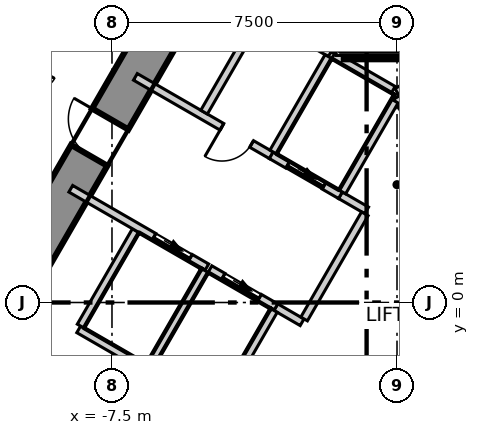
"""IFC4 building model, lengths in metres.
Left out: names, types, materials, properties, quantities, classifications, styles, units other than length and angle.
Written with IfcOpenShell. Run it as: python <this file> out.ifc"""

import sys

from ifc_helpers import new_model, si_unit, direction, frame, frame_2d, origin, place, context, subcontext, project, spatial, polyline, rectangle, outline, extrude, element, fill, save


model = new_model("IFC4")
c1 = context("Model", 3, precision=1e-05, world=origin(), true_north=direction((0.0, 1.0)))
c2 = subcontext(c1, "Body", "Model", "MODEL_VIEW")
j1 = project(units=[si_unit("LENGTHUNIT", "METRE"), si_unit("PLANEANGLEUNIT", "RADIAN")], contexts=[c1])
p1 = place(None, origin())
s1 = spatial("IfcSite", under=j1, at=p1, CompositionType="ELEMENT")
p2 = place(p1, origin())
s2 = spatial("IfcBuilding", under=s1, at=p2, CompositionType="ELEMENT")
p3 = place(p2, frame((0.0, 0.0, 95.3)))
s3 = spatial("IfcBuildingStorey", under=s2, at=p3, CompositionType="ELEMENT", Elevation=95.3)
p4 = place(p3, frame((-1.66, 15.025, -0.3), z_axis=(0.0, 0.0, 1.0), x_axis=(-0.500003780125, -0.866023221317, 0.0)))
e1 = element("IfcWall", 1, at=p4, inside=s3, PredefinedType="SHEAR", context=c2, shape_type="SweptSolid", body=[
    extrude(outline(polyline([(-0.462, -0.55), (1.483, -0.55), (3.428, -0.55), (5.374, -0.55), (7.319, -0.55), (9.264, -0.55), (11.209, -0.55), (13.155, -0.55), (15.1, -0.55), (17.045, -0.55), (18.99, -0.55), (20.936, -0.55), (22.881, -0.55), (24.826, -0.55), (23.902, 0.55), (21.949, 0.55), (19.995, 0.55), (18.042, 0.55), (16.089, 0.55), (14.135, 0.55), (12.182, 0.55), (10.229, 0.55), (8.275, 0.55), (6.322, 0.55), (4.369, 0.55), (2.415, 0.55), (0.462, 0.55), (-0.462, -0.55)])), origin(), (0.0, 0.0, 1.0), 4.2),
])
p5 = place(p4, frame((11.776, 0.0, 0.3)))
e2 = element("IfcOpeningElement", 2, at=p5, cuts=e1, PredefinedType="OPENING", context=c2, shape_type="SweptSolid", body=[
    extrude(rectangle(XDim=1.1, YDim=2.1, at=frame_2d((0.55, 1.05))), frame((0.0, 0.56, 0.0), z_axis=(0.0, -1.0, 0.0), x_axis=(1.0, 0.0, 0.0)), (0.0, 0.0, 1.0), 1.12),
])
p6 = place(p3, frame((-3.234, 36.072, 0.0), z_axis=(0.0, 0.0, 1.0), x_axis=(-0.500009108245, -0.866020145073, 0.0)))
e3 = element("IfcWall", 3, at=p6, inside=s3, PredefinedType="ELEMENTEDWALL", context=c2, shape_type="SweptSolid", body=[
    extrude(rectangle(XDim=59.225, YDim=0.2, at=frame_2d((29.613, 0.0))), origin(), (0.0, 0.0, 1.0), 3.9),
])
p7 = place(p6, frame((2.042, 0.0, 0.9)))
e4 = element("IfcOpeningElement", 4, at=p7, cuts=e3, PredefinedType="OPENING", context=c2, shape_type="SweptSolid", body=[
    extrude(rectangle(XDim=5.6, YDim=2.5, at=frame_2d((2.8, 1.25))), frame((0.0, 0.11, 0.0), z_axis=(0.0, -1.0, 0.0), x_axis=(1.0, 0.0, 0.0)), (0.0, 0.0, 1.0), 0.22),
])
p8 = place(p6, frame((9.122, 0.0, 0.9)))
e5 = element("IfcOpeningElement", 5, at=p8, cuts=e3, PredefinedType="OPENING", context=c2, shape_type="SweptSolid", body=[
    extrude(rectangle(XDim=5.6, YDim=2.5, at=frame_2d((2.8, 1.25))), frame((0.0, 0.11, 0.0), z_axis=(0.0, -1.0, 0.0), x_axis=(1.0, 0.0, 0.0)), (0.0, 0.0, 1.0), 0.22),
])
p9 = place(p6, frame((16.202, 0.0, 0.9)))
e6 = element("IfcOpeningElement", 6, at=p9, cuts=e3, PredefinedType="OPENING", context=c2, shape_type="SweptSolid", body=[
    extrude(rectangle(XDim=5.6, YDim=2.5, at=frame_2d((2.8, 1.25))), frame((0.0, 0.11, 0.0), z_axis=(0.0, -1.0, 0.0), x_axis=(1.0, 0.0, 0.0)), (0.0, 0.0, 1.0), 0.22),
])
p10 = place(p6, frame((23.282, 0.0, 0.9)))
e7 = element("IfcOpeningElement", 7, at=p10, cuts=e3, PredefinedType="OPENING", context=c2, shape_type="SweptSolid", body=[
    extrude(rectangle(XDim=5.6, YDim=2.5, at=frame_2d((2.8, 1.25))), frame((0.0, 0.11, 0.0), z_axis=(0.0, -1.0, 0.0), x_axis=(1.0, 0.0, 0.0)), (0.0, 0.0, 1.0), 0.22),
])
p11 = place(p6, frame((30.362, 0.0, 0.9)))
e8 = element("IfcOpeningElement", 8, at=p11, cuts=e3, PredefinedType="OPENING", context=c2, shape_type="SweptSolid", body=[
    extrude(rectangle(XDim=5.6, YDim=2.5, at=frame_2d((2.8, 1.25))), frame((0.0, 0.11, 0.0), z_axis=(0.0, -1.0, 0.0), x_axis=(1.0, 0.0, 0.0)), (0.0, 0.0, 1.0), 0.22),
])
p12 = place(p6, frame((37.442, 0.0, 0.9)))
e9 = element("IfcOpeningElement", 9, at=p12, cuts=e3, PredefinedType="OPENING", context=c2, shape_type="SweptSolid", body=[
    extrude(rectangle(XDim=5.6, YDim=2.5, at=frame_2d((2.8, 1.25))), frame((0.0, 0.11, 0.0), z_axis=(0.0, -1.0, 0.0), x_axis=(1.0, 0.0, 0.0)), (0.0, 0.0, 1.0), 0.22),
])
p13 = place(p6, frame((44.522, 0.0, 0.9)))
e10 = element("IfcOpeningElement", 10, at=p13, cuts=e3, PredefinedType="OPENING", context=c2, shape_type="SweptSolid", body=[
    extrude(rectangle(XDim=5.6, YDim=2.5, at=frame_2d((2.8, 1.25))), frame((0.0, 0.11, 0.0), z_axis=(0.0, -1.0, 0.0), x_axis=(1.0, 0.0, 0.0)), (0.0, 0.0, 1.0), 0.22),
])
p14 = place(p6, frame((51.602, 0.0, 0.9)))
e11 = element("IfcOpeningElement", 11, at=p14, cuts=e3, PredefinedType="OPENING", context=c2, shape_type="SweptSolid", body=[
    extrude(rectangle(XDim=5.6, YDim=2.5, at=frame_2d((2.8, 1.25))), frame((0.0, 0.11, 0.0), z_axis=(0.0, -1.0, 0.0), x_axis=(1.0, 0.0, 0.0)), (0.0, 0.0, 1.0), 0.22),
])
p15 = place(p3, frame((-16.685, -6.2, 0.0), z_axis=(0.0, 0.0, 1.0), x_axis=(0.500002442456, 0.866023993627, 0.0)))
e12 = element("IfcWall", 12, at=p15, inside=s3, PredefinedType="PARTITIONING", context=c2, shape_type="SweptSolid", body=[
    extrude(rectangle(XDim=27.424, YDim=0.15, at=frame_2d((13.712, 0.0))), origin(), (0.0, 0.0, 1.0), 3.9),
])
p16 = place(p15, frame((23.508, 0.0, 0.0)))
e13 = element("IfcOpeningElement", 13, at=p16, cuts=e12, PredefinedType="OPENING", context=c2, shape_type="SweptSolid", body=[
    extrude(rectangle(XDim=1.2, YDim=2.1, at=frame_2d((0.6, 1.05))), frame((0.0, 0.085, 0.0), z_axis=(0.0, -1.0, 0.0), x_axis=(1.0, 0.0, 0.0)), (0.0, 0.0, 1.0), 0.17),
])
p17 = place(p15, frame((13.112, 0.0, 0.0)))
e14 = element("IfcOpeningElement", 14, at=p17, cuts=e12, PredefinedType="OPENING", context=c2, shape_type="SweptSolid", body=[
    extrude(rectangle(XDim=1.2, YDim=2.1, at=frame_2d((0.6, 1.05))), frame((0.0, 0.085, 0.0), z_axis=(0.0, -1.0, 0.0), x_axis=(1.0, 0.0, 0.0)), (0.0, 0.0, 1.0), 0.17),
])
p18 = place(p15, frame((2.716, 0.0, 0.0)))
e15 = element("IfcOpeningElement", 15, at=p18, cuts=e12, PredefinedType="OPENING", context=c2, shape_type="SweptSolid", body=[
    extrude(rectangle(XDim=1.2, YDim=2.1, at=frame_2d((0.6, 1.05))), frame((0.0, 0.085, 0.0), z_axis=(0.0, -1.0, 0.0), x_axis=(1.0, 0.0, 0.0)), (0.0, 0.0, 1.0), 0.17),
])
p19 = place(p3, frame((-8.376, -0.707, 0.0), z_axis=(0.0, 0.0, 1.0), x_axis=(0.866067520717, -0.499927044236, 0.0)))
e16 = element("IfcWall", 16, at=p19, inside=s3, PredefinedType="SOLIDWALL", context=c2, shape_type="SweptSolid", body=[
    extrude(rectangle(XDim=2.1, YDim=0.2, at=frame_2d((1.05, 0.0))), origin(), (0.0, 0.0, 1.0), 3.9),
])
p20 = place(p3, frame((-8.326, -0.62, 0.0), z_axis=(0.0, 0.0, 1.0), x_axis=(0.500023687443, 0.866011727401, 0.0)))
e17 = element("IfcWall", 17, at=p20, inside=s3, PredefinedType="SOLIDWALL", context=c2, shape_type="SweptSolid", body=[
    extrude(rectangle(XDim=2.9, YDim=0.2, at=frame_2d((1.45, 0.0))), origin(), (0.0, 0.0, 1.0), 3.9),
])
p21 = place(p3, frame((-0.002, 5.541, 0.0), z_axis=(0.0, 0.0, 1.0), x_axis=(0.86600155993, 0.500041296494, 0.0)))
e18 = element("IfcWall", 18, at=p21, inside=s3, PredefinedType="SOLIDWALL", context=c2, shape_type="SweptSolid", body=[
    extrude(rectangle(XDim=4.132, YDim=0.2, at=frame_2d((2.066, 0.0))), origin(), (0.0, 0.0, 1.0), 3.9),
])
p22 = place(p3, frame((0.0, 5.4, 0.0), z_axis=(0.0, 0.0, 1.0), x_axis=(0.500103862429, -0.865965430478, 0.0)))
e19 = element("IfcWall", 19, at=p22, inside=s3, PredefinedType="SOLIDWALL", context=c2, shape_type="SweptSolid", body=[
    extrude(rectangle(XDim=2.973, YDim=0.2, at=frame_2d((1.487, 0.0))), origin(), (0.0, 0.0, 1.0), 3.9),
])
p23 = place(p22, frame((0.937, 0.0, 0.0)))
e20 = element("IfcOpeningElement", 20, at=p23, cuts=e19, PredefinedType="OPENING", context=c2, shape_type="SweptSolid", body=[
    extrude(rectangle(XDim=1.1, YDim=2.1, at=frame_2d((0.55, 1.05))), frame((0.0, 0.11, 0.0), z_axis=(0.0, -1.0, 0.0), x_axis=(1.0, 0.0, 0.0)), (0.0, 0.0, 1.0), 0.22),
])
p24 = place(p3, frame((-8.584, 2.993, 0.0), z_axis=(0.0, 0.0, 1.0), x_axis=(0.866075409494, -0.499913377567, 0.0)))
e21 = element("IfcWall", 21, at=p24, inside=s3, PredefinedType="SOLIDWALL", context=c2, shape_type="SweptSolid", body=[
    extrude(rectangle(XDim=4.133, YDim=0.2, at=frame_2d((2.066, 0.0))), origin(), (0.0, 0.0, 1.0), 3.9),
])
p25 = place(p24, frame((2.53, 0.0, 0.0)))
e22 = element("IfcOpeningElement", 22, at=p25, cuts=e21, PredefinedType="OPENING", context=c2, shape_type="SweptSolid", body=[
    extrude(rectangle(XDim=1.1, YDim=2.1, at=frame_2d((0.55, 1.05))), frame((0.0, 0.11, 0.0), z_axis=(0.0, -1.0, 0.0), x_axis=(1.0, 0.0, 0.0)), (0.0, 0.0, 1.0), 0.22),
])
p26 = place(p3, frame((-3.188, -0.122, 0.0), z_axis=(0.0, 0.0, 1.0), x_axis=(0.865705793592, -0.50055317294, 0.0)))
e23 = element("IfcWall", 23, at=p26, inside=s3, PredefinedType="SOLIDWALL", context=c2, shape_type="SweptSolid", body=[
    extrude(rectangle(XDim=0.797, YDim=0.2, at=frame_2d((0.398, 0.0))), origin(), (0.0, 0.0, 1.0), 3.9),
])
p27 = place(p3, frame((-6.884, 5.937, 0.0), z_axis=(0.0, 0.0, 1.0), x_axis=(0.866075409494, -0.499913377567, 0.0)))
e24 = element("IfcWall", 24, at=p27, inside=s3, PredefinedType="SOLIDWALL", context=c2, shape_type="SweptSolid", body=[
    extrude(rectangle(XDim=4.133, YDim=0.2, at=frame_2d((2.066, 0.0))), origin(), (0.0, 0.0, 1.0), 3.9),
])
p28 = place(p27, frame((2.63, 0.0, 0.0)))
e25 = element("IfcOpeningElement", 25, at=p28, cuts=e24, PredefinedType="OPENING", context=c2, shape_type="SweptSolid", body=[
    extrude(rectangle(XDim=0.9, YDim=2.1, at=frame_2d((0.45, 1.05))), frame((0.0, 0.11, 0.0), z_axis=(0.0, -1.0, 0.0), x_axis=(1.0, 0.0, 0.0)), (0.0, 0.0, 1.0), 0.22),
])
p29 = place(p3, frame((-1.488, 2.822, 0.0), z_axis=(0.0, 0.0, 1.0), x_axis=(0.866236612152, -0.499633997809, 0.0)))
e26 = element("IfcWall", 26, at=p29, inside=s3, PredefinedType="SOLIDWALL", context=c2, shape_type="SweptSolid", body=[
    extrude(rectangle(XDim=0.796, YDim=0.2, at=frame_2d((0.398, 0.0))), origin(), (0.0, 0.0, 1.0), 3.9),
])
p30 = place(p3, frame((-5.076, 5.009, 0.0), z_axis=(0.0, 0.0, 1.0), x_axis=(0.50002537861, 0.866010750942, 0.0)))
e27 = element("IfcWall", 27, at=p30, inside=s3, PredefinedType="SOLIDWALL", context=c2, shape_type="SweptSolid", body=[
    extrude(rectangle(XDim=3.0, YDim=0.2, at=frame_2d((1.5, 0.0))), origin(), (0.0, 0.0, 1.0), 3.9),
])
p31 = place(p3, frame((-3.489, 7.557, 0.0), z_axis=(0.0, 0.0, 1.0), x_axis=(0.866010750942, -0.50002537861, 0.0)))
e28 = element("IfcWall", 28, at=p31, inside=s3, PredefinedType="SOLIDWALL", context=c2, shape_type="SweptSolid", body=[
    extrude(rectangle(XDim=2.0, YDim=0.2, at=frame_2d((1.0, 0.0))), origin(), (0.0, 0.0, 1.0), 3.9),
])
p32 = place(p3, frame((-2.444, -0.433, 0.0), z_axis=(0.0, 0.0, 1.0), x_axis=(0.500035624827, 0.866004834804, 0.0)))
e29 = element("IfcWall", 29, at=p32, inside=s3, PredefinedType="SOLIDWALL", context=c2, shape_type="SweptSolid", body=[
    extrude(rectangle(XDim=3.194, YDim=0.2, at=frame_2d((1.597, 0.0))), origin(), (0.0, 0.0, 1.0), 3.9),
])
p33 = place(p3, frame((-6.507, -1.67, 0.0), z_axis=(0.0, 0.0, 1.0), x_axis=(0.50012328804, 0.865954211699, 0.0)))
e30 = element("IfcWall", 30, at=p33, inside=s3, PredefinedType="SOLIDWALL", context=c2, shape_type="SweptSolid", body=[
    extrude(rectangle(XDim=2.9, YDim=0.2, at=frame_2d((1.45, 0.0))), origin(), (0.0, 0.0, 1.0), 3.9),
])
p34 = place(p3, frame((-4.922, 0.879, 0.0), z_axis=(0.0, 0.0, 1.0), x_axis=(0.866073918653, -0.499915960366, 0.0)))
e31 = element("IfcWall", 31, at=p34, inside=s3, PredefinedType="SOLIDWALL", context=c2, shape_type="SweptSolid", body=[
    extrude(rectangle(XDim=2.002, YDim=0.2, at=frame_2d((1.001, 0.0))), origin(), (0.0, 0.0, 1.0), 3.9),
])
p35 = place(p34, frame((0.402, 0.0, 0.0)))
e32 = element("IfcOpeningElement", 32, at=p35, cuts=e31, PredefinedType="OPENING", context=c2, shape_type="SweptSolid", body=[
    extrude(rectangle(XDim=1.1, YDim=2.1, at=frame_2d((0.55, 1.05))), frame((0.0, 0.11, 0.0), z_axis=(0.0, -1.0, 0.0), x_axis=(1.0, 0.0, 0.0)), (0.0, 0.0, 1.0), 0.22),
])
p36 = place(p3, frame((-4.619, -2.6, 0.0), z_axis=(0.0, 0.0, 1.0), x_axis=(0.50009492287, 0.865970593103, 0.0)))
e33 = element("IfcWall", 33, at=p36, inside=s3, PredefinedType="SOLIDWALL", context=c2, shape_type="SweptSolid", body=[
    extrude(rectangle(XDim=2.761, YDim=0.2, at=frame_2d((1.381, 0.0))), origin(), (0.0, 0.0, 1.0), 3.9),
])
p37 = place(p3, frame((-3.309, 3.873, 0.0), z_axis=(0.0, 0.0, 1.0), x_axis=(0.866098583652, -0.499873227325, 0.0)))
e34 = element("IfcWall", 34, at=p37, inside=s3, PredefinedType="SOLIDWALL", context=c2, shape_type="SweptSolid", body=[
    extrude(rectangle(XDim=2.103, YDim=0.2, at=frame_2d((1.051, 0.0))), origin(), (0.0, 0.0, 1.0), 3.9),
])
p38 = place(p37, frame((0.502, 0.0, 0.0)))
e35 = element("IfcOpeningElement", 35, at=p38, cuts=e34, PredefinedType="OPENING", context=c2, shape_type="SweptSolid", body=[
    extrude(rectangle(XDim=1.1, YDim=2.1, at=frame_2d((0.55, 1.05))), frame((0.0, 0.11, 0.0), z_axis=(0.0, -1.0, 0.0), x_axis=(1.0, 0.0, 0.0)), (0.0, 0.0, 1.0), 0.22),
])
p39 = place(p3, frame((-3.257, 3.959, 0.0), z_axis=(0.0, 0.0, 1.0), x_axis=(0.50012328804, 0.865954211699, 0.0)))
e36 = element("IfcWall", 36, at=p39, inside=s3, PredefinedType="SOLIDWALL", context=c2, shape_type="SweptSolid", body=[
    extrude(rectangle(XDim=2.9, YDim=0.2, at=frame_2d((1.45, 0.0))), origin(), (0.0, 0.0, 1.0), 3.9),
])
p40 = place(p3, frame((-1.67, 6.507, 0.0), z_axis=(0.0, 0.0, 1.0), x_axis=(0.865941441609, -0.500145398563, 0.0)))
e37 = element("IfcWall", 37, at=p40, inside=s3, PredefinedType="SOLIDWALL", context=c2, shape_type="SweptSolid", body=[
    extrude(rectangle(XDim=1.815, YDim=0.2, at=frame_2d((0.908, 0.0))), origin(), (0.0, 0.0, 1.0), 3.9),
])
p41 = place(p3, frame((-1.438, 2.909, 0.0), z_axis=(0.0, 0.0, 1.0), x_axis=(0.499829630636, 0.866123744241, 0.0)))
e38 = element("IfcWall", 38, at=p41, inside=s3, PredefinedType="SOLIDWALL", context=c2, shape_type="SweptSolid", body=[
    extrude(rectangle(XDim=2.761, YDim=0.2, at=frame_2d((1.38, 0.0))), origin(), (0.0, 0.0, 1.0), 3.9),
])
p42 = place(p3, frame((-1.4, 6.5, 0.0), z_axis=(0.0, 0.0, 1.0), x_axis=(1.0, 0.0, 0.0)))
e39 = element("IfcWall", 39, at=p42, inside=s3, PredefinedType="SOLIDWALL", context=c2, shape_type="SweptSolid", body=[
    extrude(rectangle(XDim=2.8, YDim=0.2, at=frame_2d((1.4, 0.0))), origin(), (0.0, 0.0, 1.0), 3.9),
])
p43 = place(p35, origin())
e40 = element("IfcDoor", 40, at=p43, inside=s3, OperationType="SLIDING_TO_LEFT", PredefinedType="DOOR", context=c2, shape_type="SweptSolid", body=[
    extrude(rectangle(XDim=1.1, YDim=2.1, at=frame_2d((0.55, 1.05))), frame((0.0, 0.025, 0.0), z_axis=(0.0, -1.0, 0.0), x_axis=(1.0, 0.0, 0.0)), (0.0, 0.0, 1.0), 0.05),
])
fill(e32, e40)
p44 = place(p38, origin())
e41 = element("IfcDoor", 41, at=p44, inside=s3, OperationType="SLIDING_TO_LEFT", PredefinedType="DOOR", context=c2, shape_type="SweptSolid", body=[
    extrude(rectangle(XDim=1.1, YDim=2.1, at=frame_2d((0.55, 1.05))), frame((0.0, 0.025, 0.0), z_axis=(0.0, -1.0, 0.0), x_axis=(1.0, 0.0, 0.0)), (0.0, 0.0, 1.0), 0.05),
])
fill(e35, e41)
p45 = place(p25, origin())
e42 = element("IfcDoor", 42, at=p45, inside=s3, OperationType="SLIDING_TO_LEFT", PredefinedType="DOOR", context=c2, shape_type="SweptSolid", body=[
    extrude(rectangle(XDim=1.1, YDim=2.1, at=frame_2d((0.55, 1.05))), frame((0.0, 0.025, 0.0), z_axis=(0.0, -1.0, 0.0), x_axis=(1.0, 0.0, 0.0)), (0.0, 0.0, 1.0), 0.05),
])
fill(e22, e42)
p46 = place(p28, origin())
e43 = element("IfcDoor", 43, at=p46, inside=s3, OperationType="SINGLE_SWING_LEFT", PredefinedType="DOOR", context=c2, shape_type="SweptSolid", body=[
    extrude(rectangle(XDim=0.9, YDim=2.1, at=frame_2d((0.45, 1.05))), frame((0.0, 0.025, 0.0), z_axis=(0.0, -1.0, 0.0), x_axis=(1.0, 0.0, 0.0)), (0.0, 0.0, 1.0), 0.05),
])
fill(e25, e43)
p47 = place(p5, origin())
e44 = element("IfcDoor", 44, at=p47, inside=s3, OperationType="SINGLE_SWING_LEFT", PredefinedType="DOOR", context=c2, shape_type="SweptSolid", body=[
    extrude(rectangle(XDim=1.1, YDim=2.1, at=frame_2d((0.55, 1.05))), frame((0.0, 0.025, 0.0), z_axis=(0.0, -1.0, 0.0), x_axis=(1.0, 0.0, 0.0)), (0.0, 0.0, 1.0), 0.05),
])
fill(e2, e44)
save(model, sys.argv[1])
